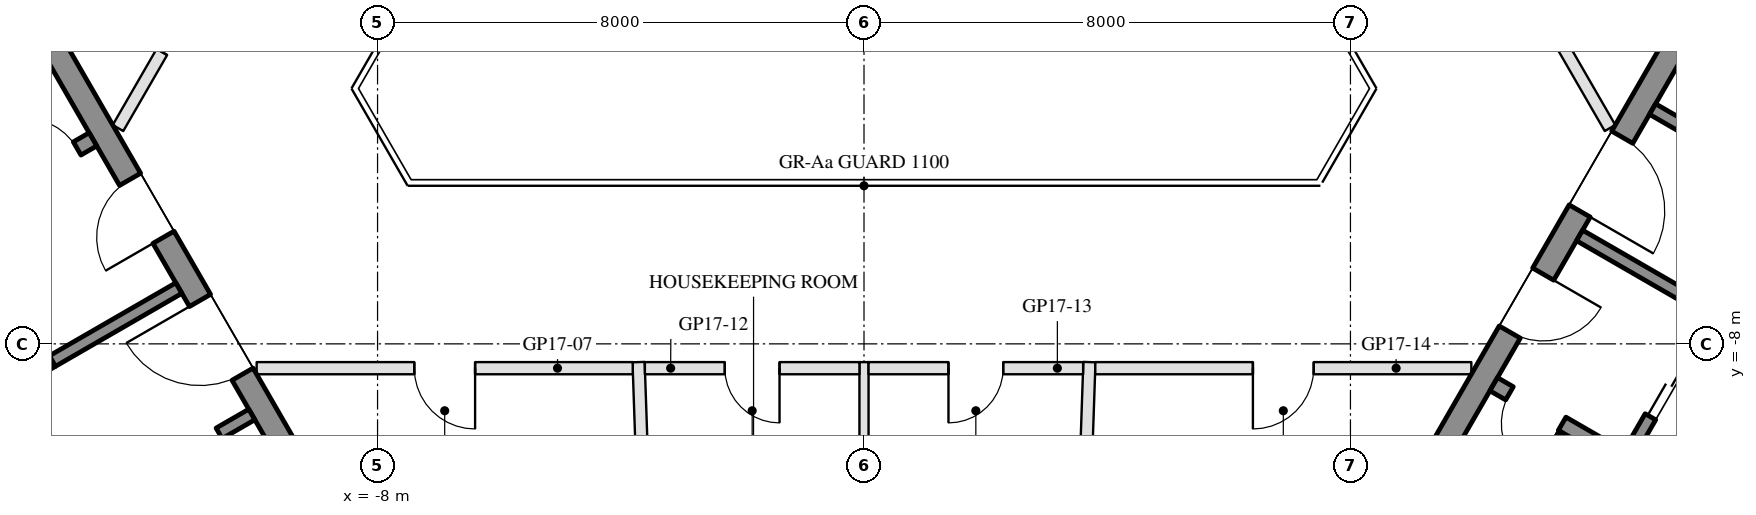
"""IFC4 building model, lengths in metres.
Left out: names, types, materials, properties, quantities, classifications, styles, units other than length and angle.
Written with IfcOpenShell. Run it as: python <this file> out.ifc"""

import sys

from ifc_helpers import new_model, si_unit, direction, frame, frame_2d, origin, place, context, subcontext, project, spatial, rectangle, extrude, element, fill, save


model = new_model("IFC4")
c1 = context("Model", 3, precision=1e-05, world=origin(), true_north=direction((0.0, 1.0)))
c2 = subcontext(c1, "Body", "Model", "MODEL_VIEW")
j1 = project(units=[si_unit("LENGTHUNIT", "METRE"), si_unit("PLANEANGLEUNIT", "RADIAN")], contexts=[c1])
p1 = place(None, origin())
s1 = spatial("IfcSite", under=j1, at=p1, CompositionType="ELEMENT")
p2 = place(p1, origin())
s2 = spatial("IfcBuilding", under=s1, at=p2, CompositionType="ELEMENT")
p3 = place(p2, frame((0.0, 0.0, 183.6)))
s3 = spatial("IfcBuildingStorey", under=s2, at=p3, CompositionType="ELEMENT", Elevation=183.6)
p4 = place(p3, frame((-13.845, -2.22, 0.0), z_axis=(0.0, 0.0, 1.0), x_axis=(0.500004234368, -0.866022959057, 0.0)))
e1 = element("IfcWall", 1, at=p4, inside=s3, PredefinedType="SHEAR", context=c2, shape_type="SweptSolid", body=[
    extrude(rectangle(XDim=10.0, YDim=0.4, at=frame_2d((5.0, 0.0))), origin(), (0.0, 0.0, 1.0), 3.5),
])
p5 = place(p4, frame((3.55, 0.0, 0.0)))
e2 = element("IfcOpeningElement", 2, at=p5, cuts=e1, PredefinedType="OPENING", context=c2, shape_type="SweptSolid", body=[
    extrude(rectangle(XDim=1.1, YDim=2.1, at=frame_2d((0.55, 1.05))), frame((0.0, 0.21, 0.0), z_axis=(0.0, -1.0, 0.0), x_axis=(1.0, 0.0, 0.0)), (0.0, 0.0, 1.0), 0.42),
])
p6 = place(p4, frame((5.85, 0.0, 0.0)))
e3 = element("IfcOpeningElement", 3, at=p6, cuts=e1, PredefinedType="OPENING", context=c2, shape_type="SweptSolid", body=[
    extrude(rectangle(XDim=1.4, YDim=2.1, at=frame_2d((0.7, 1.05))), frame((0.0, 0.21, 0.0), z_axis=(0.0, -1.0, 0.0), x_axis=(1.0, 0.0, 0.0)), (0.0, 0.0, 1.0), 0.42),
])
p7 = place(p3, frame((-12.681, -4.636, 0.0), z_axis=(0.0, 0.0, 1.0), x_axis=(-0.866021702275, -0.500006411147, 0.0)))
e4 = element("IfcWall", 4, at=p7, inside=s3, PredefinedType="SHEAR", context=c2, shape_type="SweptSolid", body=[
    extrude(rectangle(XDim=6.45, YDim=0.25, at=frame_2d((3.225, 0.0))), origin(), (0.0, 0.0, 1.0), 3.5),
])
p8 = place(p7, frame((0.3, 0.0, 0.0)))
e5 = element("IfcOpeningElement", 5, at=p8, cuts=e4, PredefinedType="OPENING", context=c2, shape_type="SweptSolid", body=[
    extrude(rectangle(XDim=1.0, YDim=2.1, at=frame_2d((0.5, 1.05))), frame((0.0, 0.135, 0.0), z_axis=(0.0, -1.0, 0.0), x_axis=(1.0, 0.0, 0.0)), (0.0, 0.0, 1.0), 0.27),
])
p9 = place(p3, frame((-14.783, -5.995, 0.0), z_axis=(0.0, 0.0, 1.0), x_axis=(0.49994636267, -0.866056369097, 0.0)))
e6 = element("IfcWall", 6, at=p9, inside=s3, PredefinedType="SHEAR", context=c2, shape_type="SweptSolid", body=[
    extrude(rectangle(XDim=2.8, YDim=0.2, at=frame_2d((1.4, 0.0))), origin(), (0.0, 0.0, 1.0), 3.5),
])
p10 = place(p9, frame((0.7, 0.0, 0.0)))
e7 = element("IfcOpeningElement", 7, at=p10, cuts=e6, PredefinedType="OPENING", context=c2, shape_type="SweptSolid", body=[
    extrude(rectangle(XDim=1.2, YDim=2.1, at=frame_2d((0.6, 1.05))), frame((0.0, 0.11, 0.0), z_axis=(0.0, -1.0, 0.0), x_axis=(1.0, 0.0, 0.0)), (0.0, 0.0, 1.0), 0.22),
])
p11 = place(p3, frame((-11.268, -7.083, 0.0), z_axis=(0.0, 0.0, 1.0), x_axis=(-0.866050077142, -0.499957262057, 0.0)))
e8 = element("IfcWall", 8, at=p11, inside=s3, PredefinedType="SHEAR", context=c2, shape_type="SweptSolid", body=[
    extrude(rectangle(XDim=2.4, YDim=0.2, at=frame_2d((1.2, 0.0))), origin(), (0.0, 0.0, 1.0), 3.5),
])
p12 = place(p3, frame((-10.068, -9.162, 0.0), z_axis=(0.0, 0.0, 1.0), x_axis=(-0.866032725843, -0.499987317609, 0.0)))
e9 = element("IfcWall", 9, at=p12, inside=s3, PredefinedType="SHEAR", context=c2, shape_type="SweptSolid", body=[
    extrude(rectangle(XDim=10.16, YDim=0.2, at=frame_2d((5.08, 0.0))), origin(), (0.0, 0.0, 1.0), 3.5),
])
p13 = place(p12, frame((0.62, 0.0, 0.0)))
e10 = element("IfcOpeningElement", 10, at=p13, cuts=e9, PredefinedType="OPENING", context=c2, shape_type="SweptSolid", body=[
    extrude(rectangle(XDim=1.1, YDim=2.1, at=frame_2d((0.55, 1.05))), frame((0.0, 0.11, 0.0), z_axis=(0.0, -1.0, 0.0), x_axis=(1.0, 0.0, 0.0)), (0.0, 0.0, 1.0), 0.22),
])
p14 = place(p12, frame((3.16, 0.0, 0.0)))
e11 = element("IfcOpeningElement", 11, at=p14, cuts=e9, PredefinedType="OPENING", context=c2, shape_type="SweptSolid", body=[
    extrude(rectangle(XDim=1.1, YDim=2.1, at=frame_2d((0.55, 1.05))), frame((0.0, 0.11, 0.0), z_axis=(0.0, -1.0, 0.0), x_axis=(1.0, 0.0, 0.0)), (0.0, 0.0, 1.0), 0.22),
])
p15 = place(p12, frame((5.7, 0.0, 0.0)))
e12 = element("IfcOpeningElement", 12, at=p15, cuts=e9, PredefinedType="OPENING", context=c2, shape_type="SweptSolid", body=[
    extrude(rectangle(XDim=1.1, YDim=2.1, at=frame_2d((0.55, 1.05))), frame((0.0, 0.11, 0.0), z_axis=(0.0, -1.0, 0.0), x_axis=(1.0, 0.0, 0.0)), (0.0, 0.0, 1.0), 0.22),
])
p16 = place(p12, frame((8.24, 0.0, 0.0)))
e13 = element("IfcOpeningElement", 13, at=p16, cuts=e9, PredefinedType="OPENING", context=c2, shape_type="SweptSolid", body=[
    extrude(rectangle(XDim=1.1, YDim=2.1, at=frame_2d((0.55, 1.05))), frame((0.0, 0.11, 0.0), z_axis=(0.0, -1.0, 0.0), x_axis=(1.0, 0.0, 0.0)), (0.0, 0.0, 1.0), 0.22),
])
p17 = place(p3, frame((8.845, -10.88, 0.0), z_axis=(0.0, 0.0, 1.0), x_axis=(0.500004234368, 0.866022959057, 0.0)))
e14 = element("IfcWall", 14, at=p17, inside=s3, PredefinedType="SHEAR", context=c2, shape_type="SweptSolid", body=[
    extrude(rectangle(XDim=10.0, YDim=0.4, at=frame_2d((5.0, 0.0))), origin(), (0.0, 0.0, 1.0), 3.5),
])
p18 = place(p17, frame((3.55, 0.0, 0.0)))
e15 = element("IfcOpeningElement", 15, at=p18, cuts=e14, PredefinedType="OPENING", context=c2, shape_type="SweptSolid", body=[
    extrude(rectangle(XDim=1.1, YDim=2.1, at=frame_2d((0.55, 1.05))), frame((0.0, 0.21, 0.0), z_axis=(0.0, -1.0, 0.0), x_axis=(1.0, 0.0, 0.0)), (0.0, 0.0, 1.0), 0.42),
])
p19 = place(p17, frame((5.85, 0.0, 0.0)))
e16 = element("IfcOpeningElement", 16, at=p19, cuts=e14, PredefinedType="OPENING", context=c2, shape_type="SweptSolid", body=[
    extrude(rectangle(XDim=1.4, YDim=2.1, at=frame_2d((0.7, 1.05))), frame((0.0, 0.21, 0.0), z_axis=(0.0, -1.0, 0.0), x_axis=(1.0, 0.0, 0.0)), (0.0, 0.0, 1.0), 0.42),
])
p20 = place(p3, frame((10.356, -8.664, 0.0), z_axis=(0.0, 0.0, 1.0), x_axis=(0.866028629588, -0.499994412703, 0.0)))
e17 = element("IfcWall", 17, at=p20, inside=s3, PredefinedType="SHEAR", context=c2, shape_type="SweptSolid", body=[
    extrude(rectangle(XDim=6.45, YDim=0.25, at=frame_2d((3.225, 0.0))), origin(), (0.0, 0.0, 1.0), 3.5),
])
p21 = place(p20, frame((0.3, 0.0, 0.0)))
e18 = element("IfcOpeningElement", 18, at=p21, cuts=e17, PredefinedType="OPENING", context=c2, shape_type="SweptSolid", body=[
    extrude(rectangle(XDim=1.0, YDim=2.1, at=frame_2d((0.5, 1.05))), frame((0.0, 0.135, 0.0), z_axis=(0.0, -1.0, 0.0), x_axis=(1.0, 0.0, 0.0)), (0.0, 0.0, 1.0), 0.27),
])
p22 = place(p3, frame((12.583, -9.805, 0.0), z_axis=(0.0, 0.0, 1.0), x_axis=(0.49994636267, 0.866056369097, 0.0)))
e19 = element("IfcWall", 19, at=p22, inside=s3, PredefinedType="SHEAR", context=c2, shape_type="SweptSolid", body=[
    extrude(rectangle(XDim=2.8, YDim=0.2, at=frame_2d((1.4, 0.0))), origin(), (0.0, 0.0, 1.0), 3.5),
])
p23 = place(p22, frame((0.7, 0.0, 0.0)))
e20 = element("IfcOpeningElement", 20, at=p23, cuts=e19, PredefinedType="OPENING", context=c2, shape_type="SweptSolid", body=[
    extrude(rectangle(XDim=1.2, YDim=2.1, at=frame_2d((0.6, 1.05))), frame((0.0, 0.11, 0.0), z_axis=(0.0, -1.0, 0.0), x_axis=(1.0, 0.0, 0.0)), (0.0, 0.0, 1.0), 0.22),
])
p24 = place(p3, frame((11.768, -6.217, 0.0), z_axis=(0.0, 0.0, 1.0), x_axis=(0.866050077142, -0.499957262057, 0.0)))
e21 = element("IfcWall", 21, at=p24, inside=s3, PredefinedType="SHEAR", context=c2, shape_type="SweptSolid", body=[
    extrude(rectangle(XDim=2.4, YDim=0.2, at=frame_2d((1.2, 0.0))), origin(), (0.0, 0.0, 1.0), 3.5),
])
p25 = place(p3, frame((12.968, -4.138, 0.0), z_axis=(0.0, 0.0, 1.0), x_axis=(0.866028328073, -0.49999493495, 0.0)))
e22 = element("IfcWall", 22, at=p25, inside=s3, PredefinedType="SHEAR", context=c2, shape_type="SweptSolid", body=[
    extrude(rectangle(XDim=10.16, YDim=0.2, at=frame_2d((5.08, 0.0))), origin(), (0.0, 0.0, 1.0), 3.5),
])
p26 = place(p25, frame((4.53, 0.0, 0.0)))
e23 = element("IfcOpeningElement", 23, at=p26, cuts=e22, PredefinedType="OPENING", context=c2, shape_type="SweptSolid", body=[
    extrude(rectangle(XDim=0.9, YDim=2.1, at=frame_2d((0.45, 1.05))), frame((0.0, 0.11, 0.0), z_axis=(0.0, -1.0, 0.0), x_axis=(1.0, 0.0, 0.0)), (0.0, 0.0, 1.0), 0.22),
])
p27 = place(p3, frame((-3.361, -18.38, 0.0), z_axis=(0.0, 0.0, 1.0), x_axis=(-0.034300534927, 0.999411563523, 0.0)))
e24 = element("IfcWall", 24, at=p27, inside=s3, PredefinedType="PARTITIONING", context=c2, shape_type="SweptSolid", body=[
    extrude(rectangle(XDim=10.086, YDim=0.2, at=frame_2d((5.043, 0.0))), origin(), (0.0, 0.0, 1.0), 3.06),
])
p28 = place(p3, frame((3.33, -19.28, 0.0), z_axis=(0.0, 0.0, 1.0), x_axis=(0.034288537327, 0.999411975217, 0.0)))
e25 = element("IfcWall", 25, at=p28, inside=s3, PredefinedType="PARTITIONING", context=c2, shape_type="SweptSolid", body=[
    extrude(rectangle(XDim=10.986, YDim=0.2, at=frame_2d((5.493, 0.0))), origin(), (0.0, 0.0, 1.0), 3.06),
])
p29 = place(p3, frame((-3.803, -8.4, 0.0), z_axis=(0.0, 0.0, 1.0), x_axis=(-1.0, 0.0, 0.0)))
e26 = element("IfcWall", 26, at=p29, inside=s3, PredefinedType="PARTITIONING", context=c2, shape_type="SweptSolid", body=[
    extrude(rectangle(XDim=6.185, YDim=0.2, at=frame_2d((3.092, 0.0))), origin(), (0.0, 0.0, 1.0), 2.95),
])
p30 = place(p29, frame((2.592, 0.0, 0.0)))
e27 = element("IfcOpeningElement", 27, at=p30, cuts=e26, PredefinedType="OPENING", context=c2, shape_type="SweptSolid", body=[
    extrude(rectangle(XDim=1.0, YDim=2.1, at=frame_2d((0.5, 1.05))), frame((0.0, 0.11, 0.0), z_axis=(0.0, -1.0, 0.0), x_axis=(1.0, 0.0, 0.0)), (0.0, 0.0, 1.0), 0.22),
])
p31 = place(p3, frame((0.0, -17.805, 0.0), z_axis=(0.0, 0.0, 1.0), x_axis=(0.0, 1.0, 0.0)))
e28 = element("IfcWall", 28, at=p31, inside=s3, PredefinedType="PARTITIONING", context=c2, shape_type="SweptSolid", body=[
    extrude(rectangle(XDim=9.505, YDim=0.15, at=frame_2d((4.752, 0.0))), origin(), (0.0, 0.0, 1.0), 2.95),
])
p32 = place(p3, frame((-0.075, -8.4, 0.0), z_axis=(0.0, 0.0, 1.0), x_axis=(-1.0, 0.0, 0.0)))
e29 = element("IfcWall", 29, at=p32, inside=s3, PredefinedType="PARTITIONING", context=c2, shape_type="SweptSolid", body=[
    extrude(rectangle(XDim=3.529, YDim=0.2, at=frame_2d((1.764, 0.0))), origin(), (0.0, 0.0, 1.0), 2.95),
])
p33 = place(p32, frame((1.314, 0.0, 0.0)))
e30 = element("IfcOpeningElement", 30, at=p33, cuts=e29, PredefinedType="OPENING", context=c2, shape_type="SweptSolid", body=[
    extrude(rectangle(XDim=0.9, YDim=2.1, at=frame_2d((0.45, 1.05))), frame((0.0, 0.11, 0.0), z_axis=(0.0, -1.0, 0.0), x_axis=(1.0, 0.0, 0.0)), (0.0, 0.0, 1.0), 0.22),
])
p34 = place(p3, frame((3.604, -8.4, 0.0), z_axis=(0.0, 0.0, 1.0), x_axis=(-1.0, 0.0, 0.0)))
e31 = element("IfcWall", 31, at=p34, inside=s3, PredefinedType="PARTITIONING", context=c2, shape_type="SweptSolid", body=[
    extrude(rectangle(XDim=3.529, YDim=0.2, at=frame_2d((1.764, 0.0))), origin(), (0.0, 0.0, 1.0), 2.95),
])
p35 = place(p34, frame((1.314, 0.0, 0.0)))
e32 = element("IfcOpeningElement", 32, at=p35, cuts=e31, PredefinedType="OPENING", context=c2, shape_type="SweptSolid", body=[
    extrude(rectangle(XDim=0.9, YDim=2.1, at=frame_2d((0.45, 1.05))), frame((0.0, 0.11, 0.0), z_axis=(0.0, -1.0, 0.0), x_axis=(1.0, 0.0, 0.0)), (0.0, 0.0, 1.0), 0.22),
])
p36 = place(p3, frame((9.988, -8.4, 0.0), z_axis=(0.0, 0.0, 1.0), x_axis=(-1.0, 0.0, 0.0)))
e33 = element("IfcWall", 33, at=p36, inside=s3, PredefinedType="PARTITIONING", context=c2, shape_type="SweptSolid", body=[
    extrude(rectangle(XDim=6.185, YDim=0.2, at=frame_2d((3.092, 0.0))), origin(), (0.0, 0.0, 1.0), 2.95),
])
p37 = place(p36, frame((2.592, 0.0, 0.0)))
e34 = element("IfcOpeningElement", 34, at=p37, cuts=e33, PredefinedType="OPENING", context=c2, shape_type="SweptSolid", body=[
    extrude(rectangle(XDim=1.0, YDim=2.1, at=frame_2d((0.5, 1.05))), frame((0.0, 0.11, 0.0), z_axis=(0.0, -1.0, 0.0), x_axis=(1.0, 0.0, 0.0)), (0.0, 0.0, 1.0), 0.22),
])
p38 = place(p3, frame((9.725, -0.043, 0.0), z_axis=(0.0, 0.0, 1.0), x_axis=(0.500014573982, -0.866016989329, 0.0)))
e35 = element("IfcWall", 35, at=p38, inside=s3, PredefinedType="PARTITIONING", context=c2, shape_type="SweptSolid", body=[
    extrude(rectangle(XDim=5.088, YDim=0.2, at=frame_2d((2.544, 0.0))), origin(), (0.0, 0.0, 1.0), 2.95),
])
p39 = place(p38, frame((2.044, 0.0, 0.0)))
e36 = element("IfcOpeningElement", 36, at=p39, cuts=e35, PredefinedType="OPENING", context=c2, shape_type="SweptSolid", body=[
    extrude(rectangle(XDim=1.0, YDim=2.1, at=frame_2d((0.5, 1.05))), frame((0.0, 0.11, 0.0), z_axis=(0.0, -1.0, 0.0), x_axis=(1.0, 0.0, 0.0)), (0.0, 0.0, 1.0), 0.22),
])
p40 = place(p3, frame((-12.269, -4.45, 0.0), z_axis=(0.0, 0.0, 1.0), x_axis=(0.500008716408, 0.866020371305, 0.0)))
e37 = element("IfcWall", 37, at=p40, inside=s3, PredefinedType="PARTITIONING", context=c2, shape_type="SweptSolid", body=[
    extrude(rectangle(XDim=3.888, YDim=0.2, at=frame_2d((1.944, 0.0))), origin(), (0.0, 0.0, 1.0), 2.95),
])
p41 = place(p40, frame((1.444, 0.0, 0.0)))
e38 = element("IfcOpeningElement", 38, at=p41, cuts=e37, PredefinedType="OPENING", context=c2, shape_type="SweptSolid", body=[
    extrude(rectangle(XDim=1.0, YDim=2.1, at=frame_2d((0.5, 1.05))), frame((0.0, 0.11, 0.0), z_axis=(0.0, -1.0, 0.0), x_axis=(1.0, 0.0, 0.0)), (0.0, 0.0, 1.0), 0.22),
])
p42 = place(p13, origin())
e39 = element("IfcDoor", 39, at=p42, inside=s3, OperationType="DOUBLE_DOOR_SLIDING", PredefinedType="DOOR", context=c2, shape_type="SweptSolid", body=[
    extrude(rectangle(XDim=1.1, YDim=2.1, at=frame_2d((0.55, 1.05))), frame((0.0, 0.025, 0.0), z_axis=(0.0, -1.0, 0.0), x_axis=(1.0, 0.0, 0.0)), (0.0, 0.0, 1.0), 0.05),
])
fill(e10, e39)
p43 = place(p5, frame((1.1, 0.0, 0.0), z_axis=(0.0, 0.0, 1.0), x_axis=(-1.0, 0.0, 0.0)))
e40 = element("IfcDoor", 40, at=p43, inside=s3, OperationType="SINGLE_SWING_LEFT", PredefinedType="DOOR", context=c2, shape_type="SweptSolid", body=[
    extrude(rectangle(XDim=1.1, YDim=2.1, at=frame_2d((0.55, 1.05))), frame((0.0, 0.025, 0.0), z_axis=(0.0, -1.0, 0.0), x_axis=(1.0, 0.0, 0.0)), (0.0, 0.0, 1.0), 0.05),
])
fill(e2, e40)
p44 = place(p6, frame((1.4, 0.0, 0.0), z_axis=(0.0, 0.0, 1.0), x_axis=(-1.0, 0.0, 0.0)))
e41 = element("IfcDoor", 41, at=p44, inside=s3, OperationType="DOUBLE_DOOR_SINGLE_SWING", PredefinedType="DOOR", context=c2, shape_type="SweptSolid", body=[
    extrude(rectangle(XDim=1.4, YDim=2.1, at=frame_2d((0.7, 1.05))), frame((0.0, 0.025, 0.0), z_axis=(0.0, -1.0, 0.0), x_axis=(1.0, 0.0, 0.0)), (0.0, 0.0, 1.0), 0.05),
])
fill(e3, e41)
p45 = place(p8, frame((1.0, 0.0, 0.0), z_axis=(0.0, 0.0, 1.0), x_axis=(-1.0, 0.0, 0.0)))
e42 = element("IfcDoor", 42, at=p45, inside=s3, OperationType="SINGLE_SWING_LEFT", PredefinedType="DOOR", context=c2, shape_type="SweptSolid", body=[
    extrude(rectangle(XDim=1.0, YDim=2.1, at=frame_2d((0.5, 1.05))), frame((0.0, 0.025, 0.0), z_axis=(0.0, -1.0, 0.0), x_axis=(1.0, 0.0, 0.0)), (0.0, 0.0, 1.0), 0.05),
])
fill(e5, e42)
p46 = place(p23, origin())
e43 = element("IfcDoor", 43, at=p46, inside=s3, OperationType="DOUBLE_DOOR_SLIDING", PredefinedType="DOOR", context=c2, shape_type="SweptSolid", body=[
    extrude(rectangle(XDim=1.2, YDim=2.1, at=frame_2d((0.6, 1.05))), frame((0.0, 0.025, 0.0), z_axis=(0.0, -1.0, 0.0), x_axis=(1.0, 0.0, 0.0)), (0.0, 0.0, 1.0), 0.05),
])
fill(e20, e43)
p47 = place(p18, frame((1.1, 0.0, 0.0), z_axis=(0.0, 0.0, 1.0), x_axis=(-1.0, 0.0, 0.0)))
e44 = element("IfcDoor", 44, at=p47, inside=s3, OperationType="SINGLE_SWING_LEFT", PredefinedType="DOOR", context=c2, shape_type="SweptSolid", body=[
    extrude(rectangle(XDim=1.1, YDim=2.1, at=frame_2d((0.55, 1.05))), frame((0.0, 0.025, 0.0), z_axis=(0.0, -1.0, 0.0), x_axis=(1.0, 0.0, 0.0)), (0.0, 0.0, 1.0), 0.05),
])
fill(e15, e44)
p48 = place(p19, frame((1.4, 0.0, 0.0), z_axis=(0.0, 0.0, 1.0), x_axis=(-1.0, 0.0, 0.0)))
e45 = element("IfcDoor", 45, at=p48, inside=s3, OperationType="DOUBLE_DOOR_SINGLE_SWING", PredefinedType="DOOR", context=c2, shape_type="SweptSolid", body=[
    extrude(rectangle(XDim=1.4, YDim=2.1, at=frame_2d((0.7, 1.05))), frame((0.0, 0.025, 0.0), z_axis=(0.0, -1.0, 0.0), x_axis=(1.0, 0.0, 0.0)), (0.0, 0.0, 1.0), 0.05),
])
fill(e16, e45)
p49 = place(p21, frame((1.0, 0.0, 0.0), z_axis=(0.0, 0.0, 1.0), x_axis=(-1.0, 0.0, 0.0)))
e46 = element("IfcDoor", 46, at=p49, inside=s3, OperationType="SINGLE_SWING_LEFT", PredefinedType="DOOR", context=c2, shape_type="SweptSolid", body=[
    extrude(rectangle(XDim=1.0, YDim=2.1, at=frame_2d((0.5, 1.05))), frame((0.0, 0.025, 0.0), z_axis=(0.0, -1.0, 0.0), x_axis=(1.0, 0.0, 0.0)), (0.0, 0.0, 1.0), 0.05),
])
fill(e18, e46)
p50 = place(p30, origin())
e47 = element("IfcDoor", 47, at=p50, inside=s3, OperationType="SINGLE_SWING_LEFT", PredefinedType="DOOR", context=c2, shape_type="SweptSolid", body=[
    extrude(rectangle(XDim=1.0, YDim=2.1, at=frame_2d((0.5, 1.05))), frame((0.0, 0.025, 0.0), z_axis=(0.0, -1.0, 0.0), x_axis=(1.0, 0.0, 0.0)), (0.0, 0.0, 1.0), 0.05),
])
fill(e27, e47)
p51 = place(p33, origin())
e48 = element("IfcDoor", 48, at=p51, inside=s3, OperationType="SINGLE_SWING_LEFT", PredefinedType="DOOR", context=c2, shape_type="SweptSolid", body=[
    extrude(rectangle(XDim=0.9, YDim=2.1, at=frame_2d((0.45, 1.05))), frame((0.0, 0.025, 0.0), z_axis=(0.0, -1.0, 0.0), x_axis=(1.0, 0.0, 0.0)), (0.0, 0.0, 1.0), 0.05),
])
fill(e30, e48)
p52 = place(p35, origin())
e49 = element("IfcDoor", 49, at=p52, inside=s3, OperationType="SINGLE_SWING_RIGHT", PredefinedType="DOOR", context=c2, shape_type="SweptSolid", body=[
    extrude(rectangle(XDim=0.9, YDim=2.1, at=frame_2d((0.45, 1.05))), frame((0.0, 0.025, 0.0), z_axis=(0.0, -1.0, 0.0), x_axis=(1.0, 0.0, 0.0)), (0.0, 0.0, 1.0), 0.05),
])
fill(e32, e49)
p53 = place(p37, origin())
e50 = element("IfcDoor", 50, at=p53, inside=s3, OperationType="SINGLE_SWING_RIGHT", PredefinedType="DOOR", context=c2, shape_type="SweptSolid", body=[
    extrude(rectangle(XDim=1.0, YDim=2.1, at=frame_2d((0.5, 1.05))), frame((0.0, 0.025, 0.0), z_axis=(0.0, -1.0, 0.0), x_axis=(1.0, 0.0, 0.0)), (0.0, 0.0, 1.0), 0.05),
])
fill(e34, e50)
p54 = place(p41, origin())
e51 = element("IfcDoor", 51, at=p54, inside=s3, OperationType="SINGLE_SWING_RIGHT", PredefinedType="DOOR", context=c2, shape_type="SweptSolid", body=[
    extrude(rectangle(XDim=1.0, YDim=2.1, at=frame_2d((0.5, 1.05))), frame((0.0, 0.025, 0.0), z_axis=(0.0, -1.0, 0.0), x_axis=(1.0, 0.0, 0.0)), (0.0, 0.0, 1.0), 0.05),
])
fill(e38, e51)
save(model, sys.argv[1])
